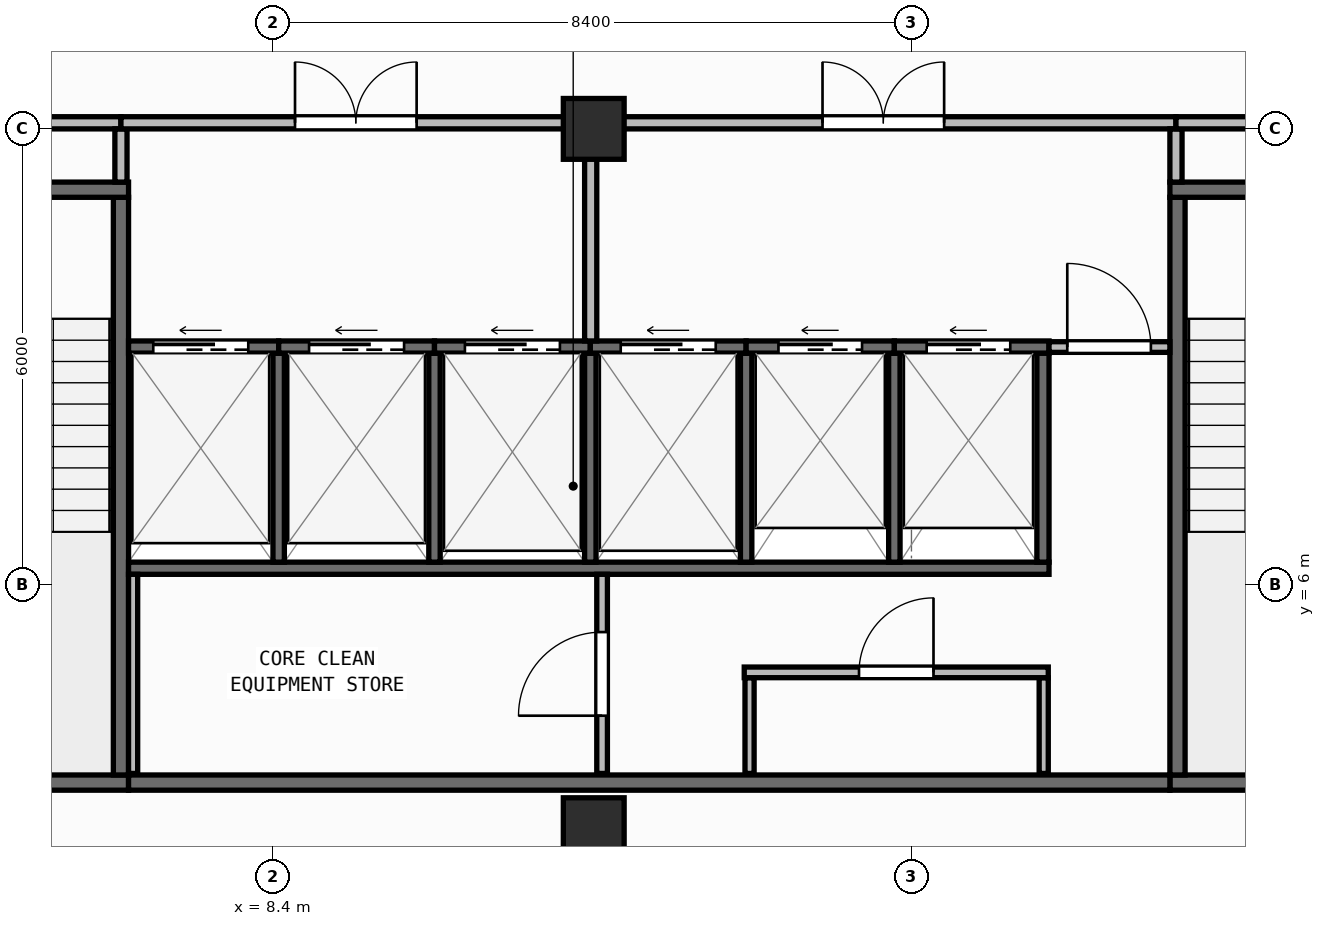
"""IFC4 building model, lengths in metres.
Left out: names, types, materials, properties, quantities, classifications, styles, units other than length and angle.
Written with IfcOpenShell. Run it as: python <this file> out.ifc"""

import sys

from ifc_helpers import new_model, si_unit, direction, frame, frame_2d, origin, origin_2d, place, context, subcontext, project, spatial, rectangle, extrude, element, fill, save


model = new_model("IFC4")
c1 = context("Model", 3, precision=1e-05, world=origin(), true_north=direction((0.0, 1.0)))
c2 = subcontext(c1, "Body", "Model", "MODEL_VIEW")
j1 = project(units=[si_unit("LENGTHUNIT", "METRE"), si_unit("PLANEANGLEUNIT", "RADIAN")], contexts=[c1])
p1 = place(None, origin())
s1 = spatial("IfcSite", under=j1, at=p1, CompositionType="ELEMENT")
p2 = place(p1, origin())
s2 = spatial("IfcBuilding", under=s1, at=p2, CompositionType="ELEMENT")
p3 = place(p2, frame((0.0, 0.0, 284.2)))
s3 = spatial("IfcBuildingStorey", under=s2, at=p3, CompositionType="ELEMENT", Elevation=284.2)
for number, where, z_axis, x_axis in (
    (1, (12.62, 2.8, 0.0), (0.0, 0.0, 1.0), (1.0, 0.0, 0.0)),
    (2, (12.62, 12.0, 0.0), (0.0, 0.0, 1.0), (1.0, 0.0, 0.0)),
):
    element("IfcColumn", number, at=place(p3, frame(where, z_axis=z_axis, x_axis=x_axis)), inside=s3, PredefinedType="COLUMN", context=c2, shape_type="SweptSolid", body=[
        extrude(rectangle(XDim=0.8, YDim=0.8, at=origin_2d()), origin(), (0.0, 0.0, 1.0), 3.95),
    ])
p4 = place(p3, frame((2.46, 0.172, 0.0), z_axis=(0.0, 0.0, 1.0), x_axis=(0.997289775118, 0.073573802713, 0.0)))
e3 = element("IfcWall", 3, at=p4, inside=s3, PredefinedType="STANDARD", context=c2, shape_type="SweptSolid", body=[
    extrude(rectangle(XDim=36.379, YDim=0.26, at=frame_2d((18.189, 0.0))), origin(), (0.0, 0.0, 1.0), 3.71),
])
p5 = place(p4, frame((16.989, 0.0, 0.9)))
e4 = element("IfcOpeningElement", 4, at=p5, cuts=e3, PredefinedType="OPENING", context=c2, shape_type="SweptSolid", body=[
    extrude(rectangle(XDim=2.4, YDim=1.65, at=frame_2d((1.2, 0.825))), frame((0.0, 0.14, 0.0), z_axis=(0.0, -1.0, 0.0), x_axis=(1.0, 0.0, 0.0)), (0.0, 0.0, 1.0), 0.28),
])
p6 = place(p3, frame((2.8, 3.4, 0.0), z_axis=(0.0, 0.0, 1.0), x_axis=(1.0, 0.0, 0.0)))
e5 = element("IfcWall", 5, at=p6, inside=s3, PredefinedType="SHEAR", context=c2, shape_type="SweptSolid", body=[
    extrude(rectangle(XDim=3.7, YDim=0.2, at=frame_2d((1.85, 0.0))), origin(), (0.0, 0.0, 1.0), 3.71),
])
p7 = place(p3, frame((6.4, 3.5, 0.0), z_axis=(0.0, 0.0, 1.0), x_axis=(0.0, 1.0, 0.0)))
e6 = element("IfcWall", 6, at=p7, inside=s3, PredefinedType="SHEAR", context=c2, shape_type="SweptSolid", body=[
    extrude(rectangle(XDim=7.6, YDim=0.2, at=frame_2d((3.8, 0.0))), origin(), (0.0, 0.0, 1.0), 3.71),
])
p8 = place(p3, frame((2.8, 11.2, 0.0), z_axis=(0.0, 0.0, 1.0), x_axis=(1.0, 0.0, 0.0)))
e7 = element("IfcWall", 7, at=p8, inside=s3, PredefinedType="SHEAR", context=c2, shape_type="SweptSolid", body=[
    extrude(rectangle(XDim=3.7, YDim=0.2, at=frame_2d((1.85, 0.0))), origin(), (0.0, 0.0, 1.0), 3.71),
])
p9 = place(p8, frame((1.2, 0.0, 0.0)))
e8 = element("IfcOpeningElement", 8, at=p9, cuts=e7, PredefinedType="OPENING", context=c2, shape_type="SweptSolid", body=[
    extrude(rectangle(XDim=1.3, YDim=2.15, at=frame_2d((0.65, 1.075))), frame((0.0, 0.11, 0.0), z_axis=(0.0, -1.0, 0.0), x_axis=(1.0, 0.0, 0.0)), (0.0, 0.0, 1.0), 0.22),
])
p10 = place(p3, frame((20.2, 3.4, 0.0), z_axis=(0.0, 0.0, 1.0), x_axis=(1.0, 0.0, 0.0)))
e9 = element("IfcWall", 9, at=p10, inside=s3, PredefinedType="SHEAR", context=c2, shape_type="SweptSolid", body=[
    extrude(rectangle(XDim=3.7, YDim=0.2, at=frame_2d((1.85, 0.0))), origin(), (0.0, 0.0, 1.0), 3.71),
])
p11 = place(p3, frame((20.3, 3.5, 0.0), z_axis=(0.0, 0.0, 1.0), x_axis=(0.0, 1.0, 0.0)))
e10 = element("IfcWall", 10, at=p11, inside=s3, PredefinedType="SHEAR", context=c2, shape_type="SweptSolid", body=[
    extrude(rectangle(XDim=7.6, YDim=0.2, at=frame_2d((3.8, 0.0))), origin(), (0.0, 0.0, 1.0), 3.71),
])
p12 = place(p3, frame((20.2, 11.2, 0.0), z_axis=(0.0, 0.0, 1.0), x_axis=(1.0, 0.0, 0.0)))
e11 = element("IfcWall", 11, at=p12, inside=s3, PredefinedType="SHEAR", context=c2, shape_type="SweptSolid", body=[
    extrude(rectangle(XDim=3.7, YDim=0.2, at=frame_2d((1.85, 0.0))), origin(), (0.0, 0.0, 1.0), 3.71),
])
p13 = place(p12, frame((1.2, 0.0, 0.0)))
e12 = element("IfcOpeningElement", 12, at=p13, cuts=e11, PredefinedType="OPENING", context=c2, shape_type="SweptSolid", body=[
    extrude(rectangle(XDim=1.3, YDim=2.15, at=frame_2d((0.65, 1.075))), frame((0.0, 0.11, 0.0), z_axis=(0.0, -1.0, 0.0), x_axis=(1.0, 0.0, 0.0)), (0.0, 0.0, 1.0), 0.22),
])
p14 = place(p3, frame((6.5, 3.4, 0.0), z_axis=(0.0, 0.0, 1.0), x_axis=(1.0, 0.0, 0.0)))
e13 = element("IfcWall", 13, at=p14, inside=s3, PredefinedType="SHEAR", context=c2, shape_type="SweptSolid", body=[
    extrude(rectangle(XDim=13.7, YDim=0.2, at=frame_2d((6.85, 0.0))), origin(), (0.0, 0.0, 1.0), 3.71),
])
p15 = place(p3, frame((6.5, 6.22, 0.0), z_axis=(0.0, 0.0, 1.0), x_axis=(1.0, 0.0, 0.0)))
e14 = element("IfcWall", 14, at=p15, inside=s3, PredefinedType="SHEAR", context=c2, shape_type="SweptSolid", body=[
    extrude(rectangle(XDim=12.11, YDim=0.16, at=frame_2d((6.055, 0.0))), origin(), (0.0, 0.0, 1.0), 3.71),
])
p16 = place(p3, frame((18.53, 6.3, 0.0), z_axis=(0.0, 0.0, 1.0), x_axis=(0.0, 1.0, 0.0)))
e15 = element("IfcWall", 15, at=p16, inside=s3, PredefinedType="SHEAR", context=c2, shape_type="SweptSolid", body=[
    extrude(rectangle(XDim=2.75, YDim=0.16, at=frame_2d((1.375, 0.0))), origin(), (0.0, 0.0, 1.0), 3.71),
])
for number, where, z_axis, x_axis in (
    (16, (8.475, 6.3, 0.0), (0.0, 0.0, 1.0), (0.0, 1.0, 0.0)),
    (17, (10.525, 6.3, 0.0), (0.0, 0.0, 1.0), (0.0, 1.0, 0.0)),
    (18, (12.575, 6.3, 0.0), (0.0, 0.0, 1.0), (0.0, 1.0, 0.0)),
    (19, (14.625, 6.3, 0.0), (0.0, 0.0, 1.0), (0.0, 1.0, 0.0)),
    (20, (16.575, 6.3, 0.0), (0.0, 0.0, 1.0), (0.0, 1.0, 0.0)),
):
    element("IfcWall", number, at=place(p3, frame(where, z_axis=z_axis, x_axis=x_axis)), inside=s3, PredefinedType="SHEAR", context=c2, shape_type="SweptSolid", body=[
        extrude(rectangle(XDim=2.75, YDim=0.15, at=frame_2d((1.375, 0.0))), origin(), (0.0, 0.0, 1.0), 3.71),
    ])
p17 = place(p3, frame((6.5, 9.13, 0.0), z_axis=(0.0, 0.0, 1.0), x_axis=(1.0, 0.0, 0.0)))
e21 = element("IfcWall", 21, at=p17, inside=s3, PredefinedType="SHEAR", context=c2, shape_type="SweptSolid", body=[
    extrude(rectangle(XDim=1.975, YDim=0.16, at=frame_2d((0.988, 0.0))), origin(), (0.0, 0.0, 1.0), 3.71),
])
p18 = place(p17, frame((0.325, 0.0, 0.0)))
e22 = element("IfcOpeningElement", 22, at=p18, cuts=e21, PredefinedType="OPENING", context=c2, shape_type="SweptSolid", body=[
    extrude(rectangle(XDim=1.25, YDim=2.15, at=frame_2d((0.625, 1.075))), frame((0.0, 0.09, 0.0), z_axis=(0.0, -1.0, 0.0), x_axis=(1.0, 0.0, 0.0)), (0.0, 0.0, 1.0), 0.18),
])
p19 = place(p3, frame((8.475, 9.13, 0.0), z_axis=(0.0, 0.0, 1.0), x_axis=(1.0, 0.0, 0.0)))
e23 = element("IfcWall", 23, at=p19, inside=s3, PredefinedType="SHEAR", context=c2, shape_type="SweptSolid", body=[
    extrude(rectangle(XDim=2.05, YDim=0.16, at=frame_2d((1.025, 0.0))), origin(), (0.0, 0.0, 1.0), 3.71),
])
p20 = place(p19, frame((0.4, 0.0, 0.0)))
e24 = element("IfcOpeningElement", 24, at=p20, cuts=e23, PredefinedType="OPENING", context=c2, shape_type="SweptSolid", body=[
    extrude(rectangle(XDim=1.25, YDim=2.15, at=frame_2d((0.625, 1.075))), frame((0.0, 0.09, 0.0), z_axis=(0.0, -1.0, 0.0), x_axis=(1.0, 0.0, 0.0)), (0.0, 0.0, 1.0), 0.18),
])
p21 = place(p3, frame((10.525, 9.13, 0.0), z_axis=(0.0, 0.0, 1.0), x_axis=(1.0, 0.0, 0.0)))
e25 = element("IfcWall", 25, at=p21, inside=s3, PredefinedType="SHEAR", context=c2, shape_type="SweptSolid", body=[
    extrude(rectangle(XDim=2.05, YDim=0.16, at=frame_2d((1.025, 0.0))), origin(), (0.0, 0.0, 1.0), 3.71),
])
p22 = place(p21, frame((0.4, 0.0, 0.0)))
e26 = element("IfcOpeningElement", 26, at=p22, cuts=e25, PredefinedType="OPENING", context=c2, shape_type="SweptSolid", body=[
    extrude(rectangle(XDim=1.25, YDim=2.15, at=frame_2d((0.625, 1.075))), frame((0.0, 0.09, 0.0), z_axis=(0.0, -1.0, 0.0), x_axis=(1.0, 0.0, 0.0)), (0.0, 0.0, 1.0), 0.18),
])
p23 = place(p3, frame((12.575, 9.13, 0.0), z_axis=(0.0, 0.0, 1.0), x_axis=(1.0, 0.0, 0.0)))
e27 = element("IfcWall", 27, at=p23, inside=s3, PredefinedType="SHEAR", context=c2, shape_type="SweptSolid", body=[
    extrude(rectangle(XDim=2.05, YDim=0.16, at=frame_2d((1.025, 0.0))), origin(), (0.0, 0.0, 1.0), 3.71),
])
p24 = place(p23, frame((0.4, 0.0, 0.0)))
e28 = element("IfcOpeningElement", 28, at=p24, cuts=e27, PredefinedType="OPENING", context=c2, shape_type="SweptSolid", body=[
    extrude(rectangle(XDim=1.25, YDim=2.15, at=frame_2d((0.625, 1.075))), frame((0.0, 0.09, 0.0), z_axis=(0.0, -1.0, 0.0), x_axis=(1.0, 0.0, 0.0)), (0.0, 0.0, 1.0), 0.18),
])
p25 = place(p3, frame((14.625, 9.13, 0.0), z_axis=(0.0, 0.0, 1.0), x_axis=(1.0, 0.0, 0.0)))
e29 = element("IfcWall", 29, at=p25, inside=s3, PredefinedType="SHEAR", context=c2, shape_type="SweptSolid", body=[
    extrude(rectangle(XDim=1.95, YDim=0.16, at=frame_2d((0.975, 0.0))), origin(), (0.0, 0.0, 1.0), 3.71),
])
p26 = place(p25, frame((0.425, 0.0, 0.0)))
e30 = element("IfcOpeningElement", 30, at=p26, cuts=e29, PredefinedType="OPENING", context=c2, shape_type="SweptSolid", body=[
    extrude(rectangle(XDim=1.1, YDim=2.15, at=frame_2d((0.55, 1.075))), frame((0.0, 0.09, 0.0), z_axis=(0.0, -1.0, 0.0), x_axis=(1.0, 0.0, 0.0)), (0.0, 0.0, 1.0), 0.18),
])
p27 = place(p3, frame((16.575, 9.13, 0.0), z_axis=(0.0, 0.0, 1.0), x_axis=(1.0, 0.0, 0.0)))
e31 = element("IfcWall", 31, at=p27, inside=s3, PredefinedType="SHEAR", context=c2, shape_type="SweptSolid", body=[
    extrude(rectangle(XDim=2.035, YDim=0.16, at=frame_2d((1.018, 0.0))), origin(), (0.0, 0.0, 1.0), 3.71),
])
p28 = place(p27, frame((0.425, 0.0, 0.0)))
e32 = element("IfcOpeningElement", 32, at=p28, cuts=e31, PredefinedType="OPENING", context=c2, shape_type="SweptSolid", body=[
    extrude(rectangle(XDim=1.1, YDim=2.15, at=frame_2d((0.55, 1.075))), frame((0.0, 0.09, 0.0), z_axis=(0.0, -1.0, 0.0), x_axis=(1.0, 0.0, 0.0)), (0.0, 0.0, 1.0), 0.18),
])
p29 = place(p3, frame((6.56, 3.52, 0.0), z_axis=(0.0, 0.0, 1.0), x_axis=(0.0, 1.0, 0.0)))
e33 = element("IfcWall", 33, at=p29, inside=s3, PredefinedType="PARTITIONING", context=c2, shape_type="SweptSolid", body=[
    extrude(rectangle(XDim=2.62, YDim=0.12, at=frame_2d((1.31, 0.0))), origin(), (0.0, 0.0, 1.0), 3.71),
])
p30 = place(p3, frame((12.73, 3.52, 0.0), z_axis=(0.0, 0.0, 1.0), x_axis=(0.0, 1.0, 0.0)))
e34 = element("IfcWall", 34, at=p30, inside=s3, PredefinedType="PARTITIONING", context=c2, shape_type="SweptSolid", body=[
    extrude(rectangle(XDim=2.62, YDim=0.14, at=frame_2d((1.31, 0.0))), origin(), (0.0, 0.0, 1.0), 3.71),
])
p31 = place(p30, frame((0.76, 0.0, 0.0)))
e35 = element("IfcOpeningElement", 35, at=p31, cuts=e34, PredefinedType="OPENING", context=c2, shape_type="SweptSolid", body=[
    extrude(rectangle(XDim=1.1, YDim=2.1, at=frame_2d((0.55, 1.05))), frame((0.0, 0.08, 0.0), z_axis=(0.0, -1.0, 0.0), x_axis=(1.0, 0.0, 0.0)), (0.0, 0.0, 1.0), 0.16),
])
for number, where, z_axis, x_axis in (
    (36, (14.67, 3.52, 0.0), (0.0, 0.0, 1.0), (0.0, 1.0, 0.0)),
    (37, (18.54, 3.52, 0.0), (0.0, 0.0, 1.0), (0.0, 1.0, 0.0)),
):
    element("IfcWall", number, at=place(p3, frame(where, z_axis=z_axis, x_axis=x_axis)), inside=s3, PredefinedType="PARTITIONING", context=c2, shape_type="SweptSolid", body=[
        extrude(rectangle(XDim=1.26, YDim=0.12, at=frame_2d((0.63, 0.0))), origin(), (0.0, 0.0, 1.0), 3.71),
    ])
p32 = place(p3, frame((14.6, 4.85, 0.0), z_axis=(0.0, 0.0, 1.0), x_axis=(1.0, 0.0, 0.0)))
e38 = element("IfcWall", 38, at=p32, inside=s3, PredefinedType="PARTITIONING", context=c2, shape_type="SweptSolid", body=[
    extrude(rectangle(XDim=4.0, YDim=0.14, at=frame_2d((2.0, 0.0))), origin(), (0.0, 0.0, 1.0), 3.71),
])
p33 = place(p32, frame((1.51, 0.0, 0.0)))
e39 = element("IfcOpeningElement", 39, at=p33, cuts=e38, PredefinedType="OPENING", context=c2, shape_type="SweptSolid", body=[
    extrude(rectangle(XDim=0.98, YDim=2.1, at=frame_2d((0.49, 1.05))), frame((0.0, 0.08, 0.0), z_axis=(0.0, -1.0, 0.0), x_axis=(1.0, 0.0, 0.0)), (0.0, 0.0, 1.0), 0.16),
])
p34 = place(p3, frame((18.61, 9.13, 0.0), z_axis=(0.0, 0.0, 1.0), x_axis=(1.0, 0.0, 0.0)))
e40 = element("IfcWall", 40, at=p34, inside=s3, PredefinedType="PARTITIONING", context=c2, shape_type="SweptSolid", body=[
    extrude(rectangle(XDim=1.59, YDim=0.14, at=frame_2d((0.795, 0.0))), origin(), (0.0, 0.0, 1.0), 3.71),
])
p35 = place(p34, frame((0.24, 0.0, 0.0)))
e41 = element("IfcOpeningElement", 41, at=p35, cuts=e40, PredefinedType="OPENING", context=c2, shape_type="SweptSolid", body=[
    extrude(rectangle(XDim=1.1, YDim=2.1, at=frame_2d((0.55, 1.05))), frame((0.0, 0.08, 0.0), z_axis=(0.0, -1.0, 0.0), x_axis=(1.0, 0.0, 0.0)), (0.0, 0.0, 1.0), 0.16),
])
p36 = place(p3, frame((2.8, 12.08, 0.0), z_axis=(0.0, 0.0, 1.0), x_axis=(1.0, 0.0, 0.0)))
e42 = element("IfcWall", 42, at=p36, inside=s3, PredefinedType="PARTITIONING", context=c2, shape_type="SweptSolid", body=[
    extrude(rectangle(XDim=3.6, YDim=0.16, at=frame_2d((1.8, 0.0))), origin(), (0.0, 0.0, 1.0), 3.157),
])
p37 = place(p36, frame((1.0, 0.0, 0.0)))
e43 = element("IfcOpeningElement", 43, at=p37, cuts=e42, PredefinedType="OPENING", context=c2, shape_type="SweptSolid", body=[
    extrude(rectangle(XDim=1.6, YDim=2.05, at=frame_2d((0.8, 1.025))), frame((0.0, 0.09, 0.0), z_axis=(0.0, -1.0, 0.0), x_axis=(1.0, 0.0, 0.0)), (0.0, 0.0, 1.0), 0.18),
])
p38 = place(p3, frame((6.4, 11.3, 0.0), z_axis=(0.0, 0.0, 1.0), x_axis=(0.0, 1.0, 0.0)))
e44 = element("IfcWall", 44, at=p38, inside=s3, PredefinedType="PARTITIONING", context=c2, shape_type="SweptSolid", body=[
    extrude(rectangle(XDim=0.7, YDim=0.16, at=frame_2d((0.35, 0.0))), origin(), (0.0, 0.0, 1.0), 3.71),
])
p39 = place(p3, frame((6.4, 12.08, 0.0), z_axis=(0.0, 0.0, 1.0), x_axis=(1.0, 0.0, 0.0)))
e45 = element("IfcWall", 45, at=p39, inside=s3, PredefinedType="PARTITIONING", context=c2, shape_type="SweptSolid", body=[
    extrude(rectangle(XDim=6.18, YDim=0.16, at=frame_2d((3.09, 0.0))), origin(), (0.0, 0.0, 1.0), 3.157),
])
p40 = place(p39, frame((2.29, 0.0, 0.0)))
e46 = element("IfcOpeningElement", 46, at=p40, cuts=e45, PredefinedType="OPENING", context=c2, shape_type="SweptSolid", body=[
    extrude(rectangle(XDim=1.6, YDim=2.05, at=frame_2d((0.8, 1.025))), frame((0.0, 0.09, 0.0), z_axis=(0.0, -1.0, 0.0), x_axis=(1.0, 0.0, 0.0)), (0.0, 0.0, 1.0), 0.18),
])
p41 = place(p3, frame((12.58, 9.21, 0.0), z_axis=(0.0, 0.0, 1.0), x_axis=(0.0, 1.0, 0.0)))
e47 = element("IfcWall", 47, at=p41, inside=s3, PredefinedType="PARTITIONING", context=c2, shape_type="SweptSolid", body=[
    extrude(rectangle(XDim=2.79, YDim=0.16, at=frame_2d((1.395, 0.0))), origin(), (0.0, 0.0, 1.0), 3.71),
])
p42 = place(p3, frame((12.58, 12.08, 0.0), z_axis=(0.0, 0.0, 1.0), x_axis=(1.0, 0.0, 0.0)))
e48 = element("IfcWall", 48, at=p42, inside=s3, PredefinedType="PARTITIONING", context=c2, shape_type="SweptSolid", body=[
    extrude(rectangle(XDim=7.7, YDim=0.16, at=frame_2d((3.85, 0.0))), origin(), (0.0, 0.0, 1.0), 3.157),
])
p43 = place(p42, frame((3.05, 0.0, 0.0)))
e49 = element("IfcOpeningElement", 49, at=p43, cuts=e48, PredefinedType="OPENING", context=c2, shape_type="SweptSolid", body=[
    extrude(rectangle(XDim=1.6, YDim=2.05, at=frame_2d((0.8, 1.025))), frame((0.0, 0.09, 0.0), z_axis=(0.0, -1.0, 0.0), x_axis=(1.0, 0.0, 0.0)), (0.0, 0.0, 1.0), 0.18),
])
p44 = place(p3, frame((20.28, 11.3, 0.0), z_axis=(0.0, 0.0, 1.0), x_axis=(0.0, 1.0, 0.0)))
e50 = element("IfcWall", 50, at=p44, inside=s3, PredefinedType="PARTITIONING", context=c2, shape_type="SweptSolid", body=[
    extrude(rectangle(XDim=0.7, YDim=0.16, at=frame_2d((0.35, 0.0))), origin(), (0.0, 0.0, 1.0), 3.71),
])
p45 = place(p3, frame((20.28, 12.08, 0.0), z_axis=(0.0, 0.0, 1.0), x_axis=(1.0, 0.0, 0.0)))
e51 = element("IfcWall", 51, at=p45, inside=s3, PredefinedType="PARTITIONING", context=c2, shape_type="SweptSolid", body=[
    extrude(rectangle(XDim=3.62, YDim=0.16, at=frame_2d((1.81, 0.0))), origin(), (0.0, 0.0, 1.0), 3.157),
])
p46 = place(p45, frame((1.01, 0.0, 0.0)))
e52 = element("IfcOpeningElement", 52, at=p46, cuts=e51, PredefinedType="OPENING", context=c2, shape_type="SweptSolid", body=[
    extrude(rectangle(XDim=1.6, YDim=2.05, at=frame_2d((0.8, 1.025))), frame((0.0, 0.09, 0.0), z_axis=(0.0, -1.0, 0.0), x_axis=(1.0, 0.0, 0.0)), (0.0, 0.0, 1.0), 0.18),
])
p47 = place(p18, origin())
e53 = element("IfcDoor", 53, at=p47, inside=s3, OperationType="SLIDING_TO_LEFT", PredefinedType="DOOR", context=c2, shape_type="SweptSolid", body=[
    extrude(rectangle(XDim=1.25, YDim=2.15, at=frame_2d((0.625, 1.075))), frame((0.0, 0.025, 0.0), z_axis=(0.0, -1.0, 0.0), x_axis=(1.0, 0.0, 0.0)), (0.0, 0.0, 1.0), 0.05),
])
fill(e22, e53)
p48 = place(p20, origin())
e54 = element("IfcDoor", 54, at=p48, inside=s3, OperationType="SLIDING_TO_LEFT", PredefinedType="DOOR", context=c2, shape_type="SweptSolid", body=[
    extrude(rectangle(XDim=1.25, YDim=2.15, at=frame_2d((0.625, 1.075))), frame((0.0, 0.025, 0.0), z_axis=(0.0, -1.0, 0.0), x_axis=(1.0, 0.0, 0.0)), (0.0, 0.0, 1.0), 0.05),
])
fill(e24, e54)
p49 = place(p22, origin())
e55 = element("IfcDoor", 55, at=p49, inside=s3, OperationType="SLIDING_TO_LEFT", PredefinedType="DOOR", context=c2, shape_type="SweptSolid", body=[
    extrude(rectangle(XDim=1.25, YDim=2.15, at=frame_2d((0.625, 1.075))), frame((0.0, 0.025, 0.0), z_axis=(0.0, -1.0, 0.0), x_axis=(1.0, 0.0, 0.0)), (0.0, 0.0, 1.0), 0.05),
])
fill(e26, e55)
p50 = place(p24, origin())
e56 = element("IfcDoor", 56, at=p50, inside=s3, OperationType="SLIDING_TO_LEFT", PredefinedType="DOOR", context=c2, shape_type="SweptSolid", body=[
    extrude(rectangle(XDim=1.25, YDim=2.15, at=frame_2d((0.625, 1.075))), frame((0.0, 0.025, 0.0), z_axis=(0.0, -1.0, 0.0), x_axis=(1.0, 0.0, 0.0)), (0.0, 0.0, 1.0), 0.05),
])
fill(e28, e56)
p51 = place(p26, origin())
e57 = element("IfcDoor", 57, at=p51, inside=s3, OperationType="SLIDING_TO_LEFT", PredefinedType="DOOR", context=c2, shape_type="SweptSolid", body=[
    extrude(rectangle(XDim=1.1, YDim=2.15, at=frame_2d((0.55, 1.075))), frame((0.0, 0.025, 0.0), z_axis=(0.0, -1.0, 0.0), x_axis=(1.0, 0.0, 0.0)), (0.0, 0.0, 1.0), 0.05),
])
fill(e30, e57)
p52 = place(p28, origin())
e58 = element("IfcDoor", 58, at=p52, inside=s3, OperationType="SLIDING_TO_LEFT", PredefinedType="DOOR", context=c2, shape_type="SweptSolid", body=[
    extrude(rectangle(XDim=1.1, YDim=2.15, at=frame_2d((0.55, 1.075))), frame((0.0, 0.025, 0.0), z_axis=(0.0, -1.0, 0.0), x_axis=(1.0, 0.0, 0.0)), (0.0, 0.0, 1.0), 0.05),
])
fill(e32, e58)
p53 = place(p31, origin())
e59 = element("IfcDoor", 59, at=p53, inside=s3, OperationType="SINGLE_SWING_LEFT", PredefinedType="DOOR", context=c2, shape_type="SweptSolid", body=[
    extrude(rectangle(XDim=1.1, YDim=2.1, at=frame_2d((0.55, 1.05))), frame((0.0, 0.025, 0.0), z_axis=(0.0, -1.0, 0.0), x_axis=(1.0, 0.0, 0.0)), (0.0, 0.0, 1.0), 0.05),
])
fill(e35, e59)
p54 = place(p33, origin())
e60 = element("IfcDoor", 60, at=p54, inside=s3, OperationType="SINGLE_SWING_RIGHT", PredefinedType="DOOR", context=c2, shape_type="SweptSolid", body=[
    extrude(rectangle(XDim=0.98, YDim=2.1, at=frame_2d((0.49, 1.05))), frame((0.0, 0.025, 0.0), z_axis=(0.0, -1.0, 0.0), x_axis=(1.0, 0.0, 0.0)), (0.0, 0.0, 1.0), 0.05),
])
fill(e39, e60)
p55 = place(p35, origin())
e61 = element("IfcDoor", 61, at=p55, inside=s3, OperationType="SINGLE_SWING_LEFT", PredefinedType="DOOR", context=c2, shape_type="SweptSolid", body=[
    extrude(rectangle(XDim=1.1, YDim=2.1, at=frame_2d((0.55, 1.05))), frame((0.0, 0.025, 0.0), z_axis=(0.0, -1.0, 0.0), x_axis=(1.0, 0.0, 0.0)), (0.0, 0.0, 1.0), 0.05),
])
fill(e41, e61)
p56 = place(p40, origin())
e62 = element("IfcDoor", 62, at=p56, inside=s3, OperationType="DOUBLE_DOOR_SINGLE_SWING", PredefinedType="DOOR", context=c2, shape_type="SweptSolid", body=[
    extrude(rectangle(XDim=1.6, YDim=2.05, at=frame_2d((0.8, 1.025))), frame((0.0, 0.025, 0.0), z_axis=(0.0, -1.0, 0.0), x_axis=(1.0, 0.0, 0.0)), (0.0, 0.0, 1.0), 0.05),
])
fill(e46, e62)
p57 = place(p43, origin())
e63 = element("IfcDoor", 63, at=p57, inside=s3, OperationType="DOUBLE_DOOR_SINGLE_SWING", PredefinedType="DOOR", context=c2, shape_type="SweptSolid", body=[
    extrude(rectangle(XDim=1.6, YDim=2.05, at=frame_2d((0.8, 1.025))), frame((0.0, 0.025, 0.0), z_axis=(0.0, -1.0, 0.0), x_axis=(1.0, 0.0, 0.0)), (0.0, 0.0, 1.0), 0.05),
])
fill(e49, e63)
save(model, sys.argv[1])
